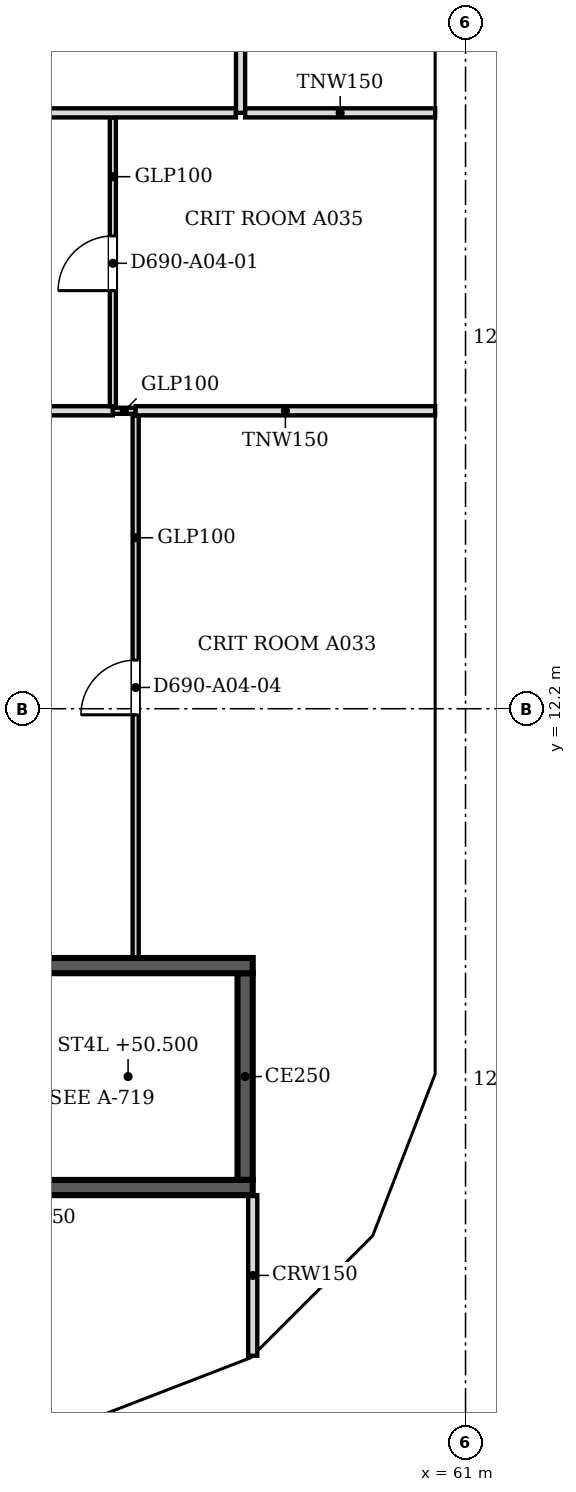
"""IFC4 building model, lengths in metres.
Left out: names, types, materials, properties, quantities, classifications, styles, units other than length and angle.
Written with IfcOpenShell. Run it as: python <this file> out.ifc"""

import sys

from ifc_helpers import new_model, si_unit, direction, frame, frame_2d, origin, place, context, subcontext, project, spatial, polyline, rectangle, outline, extrude, faceted_brep, source, transform, mapped, element, fill, save


model = new_model("IFC4")
c1 = context("Model", 3, precision=1e-05, world=origin(), true_north=direction((0.0, 1.0)))
c2 = subcontext(c1, "Body", "Model", "MODEL_VIEW")
j1 = project(units=[si_unit("LENGTHUNIT", "METRE"), si_unit("PLANEANGLEUNIT", "RADIAN")], contexts=[c1])
p1 = place(None, origin())
s1 = spatial("IfcSite", under=j1, at=p1, CompositionType="ELEMENT")
p2 = place(p1, origin())
s2 = spatial("IfcBuilding", under=s1, at=p2, CompositionType="ELEMENT")
p3 = place(p2, frame((0.0, 0.0, 48.6)))
s3 = spatial("IfcBuildingStorey", under=s2, at=p3, CompositionType="ELEMENT", Elevation=48.6)
m1 = source(origin(), c2, "Body", "Brep", [
    faceted_brep([(0.047, -0.25, 0.0), (2.997, -0.25, 3.8), (0.047, -0.25, 7.6), (0.0, -0.25, 7.541), (0.0, -0.25, 0.059), (0.093, 0.25, 7.54), (2.944, 0.25, 3.868), (2.944, 0.25, 3.732), (0.093, 0.25, 0.06), (2.997, 0.0, 3.8), (0.047, 0.0, 0.0), (0.047, 0.0, 7.6)], [[[0, 1, 2, 3, 4]], [[5, 6, 7, 8]], [[8, 7, 9, 1, 0, 10]], [[6, 5, 11, 2, 1, 9]], [[3, 2, 11]], [[10, 0, 4]], [[8, 10, 4, 3, 11, 5]], [[7, 6, 9]]]),
])
p4 = place(p3, frame((54.81, 0.233, -3.8), z_axis=(0.0, 0.0, 1.0), x_axis=(0.932990326376, 0.359901446078, 0.0)))
e1 = element("IfcWall", 1, at=p4, inside=s3, PredefinedType="SOLIDWALL", context=c2, shape_type="MappedRepresentation", body=[
    mapped(m1, transform((0.0, 0.0, 0.0), scale=1.0)),
])
m2 = source(origin(), c2, "Body", "SweptSolid", [
    extrude(outline(polyline([(0.247, 0.665), (2.681, 3.8), (0.247, 6.935), (0.247, 0.665)])), frame((0.0, 0.26, 0.0), z_axis=(0.0, -1.0, 0.0), x_axis=(1.0, 0.0, 0.0)), (0.0, 0.0, 1.0), 0.52),
])
p5 = place(p4, origin())
e2 = element("IfcOpeningElement", 2, at=p5, cuts=e1, PredefinedType="OPENING", context=c2, shape_type="MappedRepresentation", body=[
    mapped(m2, transform((0.0, 0.0, 0.0), scale=1.0)),
])
m3 = source(origin(), c2, "Body", "Brep", [
    faceted_brep([(2.944, -0.25, 0.0), (2.997, -0.25, 0.068), (2.997, -0.25, 7.532), (2.944, -0.25, 7.6), (0.0, -0.25, 3.8), (0.053, 0.25, 3.868), (2.891, 0.25, 7.532), (2.891, 0.25, 0.068), (0.053, 0.25, 3.732), (2.944, 0.0, 0.0), (2.944, 0.0, 7.6), (0.0, 0.0, 3.8)], [[[0, 1, 2, 3, 4]], [[5, 6, 7, 8]], [[1, 0, 9]], [[10, 3, 2]], [[6, 5, 11, 4, 3, 10]], [[8, 7, 9, 0, 4, 11]], [[8, 11, 5]], [[1, 9, 7, 6, 10, 2]]]),
])
p6 = place(p3, frame((57.606, 1.312, -3.8), z_axis=(0.0, 0.0, 1.0), x_axis=(0.707147509625, 0.707066050402, 0.0)))
e3 = element("IfcWall", 3, at=p6, inside=s3, PredefinedType="SOLIDWALL", context=c2, shape_type="MappedRepresentation", body=[
    mapped(m3, transform((0.0, 0.0, 0.0), scale=1.0)),
])
m4 = source(origin(), c2, "Body", "SweptSolid", [
    extrude(outline(polyline([(2.744, 6.934), (0.316, 3.8), (2.744, 0.666), (2.744, 6.934)])), frame((0.0, 0.26, 0.0), z_axis=(0.0, -1.0, 0.0), x_axis=(1.0, 0.0, 0.0)), (0.0, 0.0, 1.0), 0.52),
])
p7 = place(p6, origin())
e4 = element("IfcOpeningElement", 4, at=p7, cuts=e3, PredefinedType="OPENING", context=c2, shape_type="MappedRepresentation", body=[
    mapped(m4, transform((0.0, 0.0, 0.0), scale=1.0)),
])
m5 = source(origin(), c2, "Body", "Brep", [
    faceted_brep([(0.053, -0.25, 0.0), (3.003, -0.25, 3.8), (0.053, -0.25, 7.6), (0.0, -0.25, 7.531), (0.0, -0.25, 0.068), (0.106, 0.25, 7.532), (2.957, 0.25, 3.86), (2.957, 0.25, 3.74), (0.106, 0.25, 0.068), (3.003, 0.0, 3.8), (0.053, 0.0, 0.0), (0.053, 0.0, 7.6)], [[[0, 1, 2, 3, 4]], [[5, 6, 7, 8]], [[8, 7, 9, 1, 0, 10]], [[6, 5, 11, 2, 1, 9]], [[3, 2, 11]], [[10, 0, 4]], [[8, 10, 4, 3, 11, 5]], [[7, 6, 9]]]),
])
p8 = place(p3, frame((59.669, 3.344, -3.8), z_axis=(0.0, 0.0, 1.0), x_axis=(0.35992665181, 0.932980602862, 0.0)))
e5 = element("IfcWall", 5, at=p8, inside=s3, PredefinedType="SOLIDWALL", context=c2, shape_type="MappedRepresentation", body=[
    mapped(m5, transform((0.0, 0.0, 0.0), scale=1.0)),
])
m6 = source(origin(), c2, "Body", "SweptSolid", [
    extrude(outline(polyline([(0.253, 0.665), (2.687, 3.8), (0.253, 6.935), (0.253, 0.665)])), frame((0.0, 0.26, 0.0), z_axis=(0.0, -1.0, 0.0), x_axis=(1.0, 0.0, 0.0)), (0.0, 0.0, 1.0), 0.52),
])
p9 = place(p8, origin())
e6 = element("IfcOpeningElement", 6, at=p9, cuts=e5, PredefinedType="OPENING", context=c2, shape_type="MappedRepresentation", body=[
    mapped(m6, transform((0.0, 0.0, 0.0), scale=1.0)),
])
m7 = source(origin(), c2, "Body", "Brep", [
    faceted_brep([(3.003, -0.25, 0.0), (6.053, -0.25, 3.8), (3.003, -0.25, 7.6), (0.0, -0.25, 3.8), (0.047, 0.25, 3.859), (3.003, 0.25, 7.6), (6.053, 0.25, 3.8), (3.003, 0.25, 0.0), (0.047, 0.25, 3.741), (0.0, 0.0, 3.8)], [[[0, 1, 2, 3]], [[4, 5, 6, 7, 8]], [[7, 6, 1, 0]], [[6, 5, 2, 1]], [[5, 4, 9, 3, 2]], [[8, 7, 0, 3, 9]], [[8, 9, 4]]]),
])
p10 = place(p3, frame((60.75, 6.146, -3.8), z_axis=(0.0, 0.0, 1.0), x_axis=(0.0, 1.0, 0.0)))
e7 = element("IfcWall", 7, at=p10, inside=s3, PredefinedType="SOLIDWALL", context=c2, shape_type="MappedRepresentation", body=[
    mapped(m7, transform((0.0, 0.0, 0.0), scale=1.0)),
])
m8 = source(origin(), c2, "Body", "SweptSolid", [
    extrude(outline(polyline([(3.005, 0.401), (5.733, 3.8), (3.005, 7.199), (0.319, 3.8), (3.005, 0.401)])), frame((0.0, 0.26, 0.0), z_axis=(0.0, -1.0, 0.0), x_axis=(1.0, 0.0, 0.0)), (0.0, 0.0, 1.0), 0.52),
])
p11 = place(p10, origin())
e8 = element("IfcOpeningElement", 8, at=p11, cuts=e7, PredefinedType="OPENING", context=c2, shape_type="MappedRepresentation", body=[
    mapped(m8, transform((0.0, 0.0, 0.0), scale=1.0)),
])
m9 = source(origin(), c2, "Body", "SweptSolid", [
    extrude(outline(polyline([(3.05, 0.0), (6.1, 3.8), (3.05, 7.6), (0.0, 3.8), (3.05, 0.0)])), frame((0.0, 0.25, 0.0), z_axis=(0.0, -1.0, 0.0), x_axis=(1.0, 0.0, 0.0)), (0.0, 0.0, 1.0), 0.5),
])
p12 = place(p3, frame((60.75, 12.2, -3.8), z_axis=(0.0, 0.0, 1.0), x_axis=(0.0, 1.0, 0.0)))
e9 = element("IfcWall", 9, at=p12, inside=s3, PredefinedType="SOLIDWALL", context=c2, shape_type="MappedRepresentation", body=[
    mapped(m9, transform((0.0, 0.0, 0.0), scale=1.0)),
])
m10 = source(origin(), c2, "Body", "SweptSolid", [
    extrude(outline(polyline([(3.05, 0.399), (5.78, 3.8), (3.05, 7.2), (0.321, 3.8), (3.05, 0.399)])), frame((0.0, 0.26, 0.0), z_axis=(0.0, -1.0, 0.0), x_axis=(1.0, 0.0, 0.0)), (0.0, 0.0, 1.0), 0.52),
])
p13 = place(p12, origin())
e10 = element("IfcOpeningElement", 10, at=p13, cuts=e9, PredefinedType="OPENING", context=c2, shape_type="MappedRepresentation", body=[
    mapped(m10, transform((0.0, 0.0, 0.0), scale=1.0)),
])
m11 = source(origin(), c2, "Body", "Brep", [
    faceted_brep([(3.05, -0.25, 0.0), (6.1, -0.25, 3.8), (6.1, -0.25, 3.8), (3.05, -0.25, 7.6), (0.0, -0.25, 3.8), (0.0, 0.25, 3.8), (3.05, 0.25, 7.6), (6.1, 0.25, 3.8), (6.1, 0.25, 3.8), (3.05, 0.25, 0.0)], [[[0, 1, 2, 3, 4]], [[5, 6, 7, 8, 9]], [[9, 8, 1, 0]], [[7, 6, 3, 2]], [[6, 5, 4, 3]], [[5, 9, 0, 4]], [[1, 8, 7, 2]]]),
])
p14 = place(p3, frame((60.75, 18.3, -3.8), z_axis=(0.0, 0.0, 1.0), x_axis=(0.0, 1.0, 0.0)))
e11 = element("IfcWall", 11, at=p14, inside=s3, PredefinedType="SOLIDWALL", context=c2, shape_type="MappedRepresentation", body=[
    mapped(m11, transform((0.0, 0.0, 0.0), scale=1.0)),
])
p15 = place(p14, origin())
e12 = element("IfcOpeningElement", 12, at=p15, cuts=e11, PredefinedType="OPENING", context=c2, shape_type="MappedRepresentation", body=[
    mapped(m10, transform((0.0, 0.0, 0.0), scale=1.0)),
])
p16 = place(p2, frame((0.0, 0.0, 52.4)))
s4 = spatial("IfcBuildingStorey", under=s2, at=p16, CompositionType="ELEMENT", Elevation=52.4)
m12 = source(origin(), c2, "Body", "Brep", [
    faceted_brep([(2.95, -0.25, 0.0), (3.003, -0.25, 0.068), (3.003, -0.25, 7.531), (2.95, -0.25, 7.6), (0.0, -0.25, 3.8), (0.047, 0.25, 3.86), (2.898, 0.25, 7.532), (2.898, 0.25, 0.068), (0.047, 0.25, 3.74), (2.95, 0.0, 0.0), (2.95, 0.0, 7.6), (0.0, 0.0, 3.8)], [[[0, 1, 2, 3, 4]], [[5, 6, 7, 8]], [[1, 0, 9]], [[10, 3, 2]], [[6, 5, 11, 4, 3, 10]], [[8, 7, 9, 0, 4, 11]], [[8, 11, 5]], [[1, 9, 7, 6, 10, 2]]]),
])
p17 = place(p16, frame((54.854, 0.25, -3.8), z_axis=(0.0, 0.0, 1.0), x_axis=(0.932970071518, 0.359953949349, 0.0)))
e13 = element("IfcWall", 13, at=p17, inside=s4, PredefinedType="SOLIDWALL", context=c2, shape_type="MappedRepresentation", body=[
    mapped(m12, transform((0.0, 0.0, 0.0), scale=1.0)),
])
m13 = source(origin(), c2, "Body", "SweptSolid", [
    extrude(outline(polyline([(2.75, 6.935), (0.316, 3.8), (2.75, 0.665), (2.75, 6.935)])), frame((0.0, 0.26, 0.0), z_axis=(0.0, -1.0, 0.0), x_axis=(1.0, 0.0, 0.0)), (0.0, 0.0, 1.0), 0.52),
])
p18 = place(p17, origin())
e14 = element("IfcOpeningElement", 14, at=p18, cuts=e13, PredefinedType="OPENING", context=c2, shape_type="MappedRepresentation", body=[
    mapped(m13, transform((0.0, 0.0, 0.0), scale=1.0)),
])
m14 = source(origin(), c2, "Body", "Brep", [
    faceted_brep([(0.053, -0.25, 0.0), (2.997, -0.25, 3.8), (0.053, -0.25, 7.6), (0.0, -0.25, 7.532), (0.0, -0.25, 0.068), (0.106, 0.25, 7.531), (2.944, 0.25, 3.868), (2.944, 0.25, 3.732), (0.106, 0.25, 0.068), (2.997, 0.0, 3.8), (0.053, 0.0, 0.0), (0.053, 0.0, 7.6)], [[[0, 1, 2, 3, 4]], [[5, 6, 7, 8]], [[8, 7, 9, 1, 0, 10]], [[6, 5, 11, 2, 1, 9]], [[3, 2, 11]], [[10, 0, 4]], [[8, 10, 4, 3, 11, 5]], [[9, 7, 6]]]),
])
p19 = place(p16, frame((57.569, 1.274, -3.8), z_axis=(0.0, 0.0, 1.0), x_axis=(0.707066050402, 0.707147509625, 0.0)))
e15 = element("IfcWall", 15, at=p19, inside=s4, PredefinedType="SOLIDWALL", context=c2, shape_type="MappedRepresentation", body=[
    mapped(m14, transform((0.0, 0.0, 0.0), scale=1.0)),
])
m15 = source(origin(), c2, "Body", "SweptSolid", [
    extrude(outline(polyline([(0.253, 0.666), (2.681, 3.8), (0.253, 6.934), (0.253, 0.666)])), frame((0.0, 0.26, 0.0), z_axis=(0.0, -1.0, 0.0), x_axis=(1.0, 0.0, 0.0)), (0.0, 0.0, 1.0), 0.52),
])
p20 = place(p19, origin())
e16 = element("IfcOpeningElement", 16, at=p20, cuts=e15, PredefinedType="OPENING", context=c2, shape_type="MappedRepresentation", body=[
    mapped(m15, transform((0.0, 0.0, 0.0), scale=1.0)),
])
m16 = source(origin(), c2, "Body", "Brep", [
    faceted_brep([(2.95, -0.25, 0.0), (2.997, -0.25, 0.059), (2.997, -0.25, 7.541), (2.95, -0.25, 7.6), (0.0, -0.25, 3.8), (0.053, 0.25, 3.868), (2.904, 0.25, 7.54), (2.904, 0.25, 0.06), (0.053, 0.25, 3.732), (2.95, 0.0, 0.0), (2.95, 0.0, 7.6), (0.0, 0.0, 3.8)], [[[0, 1, 2, 3, 4]], [[5, 6, 7, 8]], [[1, 0, 9]], [[10, 3, 2]], [[6, 5, 11, 4, 3, 10]], [[8, 7, 9, 0, 4, 11]], [[8, 11, 5]], [[1, 9, 7, 6, 10, 2]]]),
])
p21 = place(p16, frame((59.688, 3.394, -3.8), z_axis=(0.0, 0.0, 1.0), x_axis=(0.359972353723, 0.932962970624, 0.0)))
e17 = element("IfcWall", 17, at=p21, inside=s4, PredefinedType="SOLIDWALL", context=c2, shape_type="MappedRepresentation", body=[
    mapped(m16, transform((0.0, 0.0, 0.0), scale=1.0)),
])
p22 = place(p21, origin())
e18 = element("IfcOpeningElement", 18, at=p22, cuts=e17, PredefinedType="OPENING", context=c2, shape_type="MappedRepresentation", body=[
    mapped(m13, transform((0.0, 0.0, 0.0), scale=1.0)),
])
m17 = source(origin(), c2, "Body", "Brep", [
    faceted_brep([(0.047, -0.25, 0.0), (3.05, -0.25, 3.8), (0.047, -0.25, 7.6), (0.0, -0.25, 7.54), (0.0, -0.25, 0.06), (0.093, 0.25, 7.541), (3.05, 0.25, 3.8), (0.093, 0.25, 0.059), (0.047, 0.0, 0.0), (0.047, 0.0, 7.6)], [[[0, 1, 2, 3, 4]], [[5, 6, 7]], [[7, 6, 1, 0, 8]], [[6, 5, 9, 2, 1]], [[3, 2, 9]], [[8, 0, 4]], [[7, 8, 4, 3, 9, 5]]]),
])
p23 = place(p16, frame((60.75, 6.1, -3.8), z_axis=(0.0, 0.0, 1.0), x_axis=(0.0, 1.0, 0.0)))
e19 = element("IfcWall", 19, at=p23, inside=s4, PredefinedType="SOLIDWALL", context=c2, shape_type="MappedRepresentation", body=[
    mapped(m17, transform((0.0, 0.0, 0.0), scale=1.0)),
])
m18 = source(origin(), c2, "Body", "SweptSolid", [
    extrude(outline(polyline([(0.247, 0.656), (2.731, 3.8), (0.247, 6.944), (0.247, 0.656)])), frame((0.0, 0.26, 0.0), z_axis=(0.0, -1.0, 0.0), x_axis=(1.0, 0.0, 0.0)), (0.0, 0.0, 1.0), 0.52),
])
p24 = place(p23, origin())
e20 = element("IfcOpeningElement", 20, at=p24, cuts=e19, PredefinedType="OPENING", context=c2, shape_type="MappedRepresentation", body=[
    mapped(m18, transform((0.0, 0.0, 0.0), scale=1.0)),
])
m19 = source(origin(), c2, "Body", "SweptSolid", [
    extrude(outline(polyline([(3.05, 0.0), (6.1, 3.8), (3.05, 7.6), (0.0, 3.8), (3.05, 0.0)])), frame((0.0, 0.25, 0.0), z_axis=(0.0, -1.0, 0.0), x_axis=(1.0, 0.0, 0.0)), (0.0, 0.0, 1.0), 0.5),
])
p25 = place(p16, frame((60.75, 9.15, -3.8), z_axis=(0.0, 0.0, 1.0), x_axis=(0.0, 1.0, 0.0)))
e21 = element("IfcWall", 21, at=p25, inside=s4, PredefinedType="SOLIDWALL", context=c2, shape_type="MappedRepresentation", body=[
    mapped(m19, transform((0.0, 0.0, 0.0), scale=1.0)),
])
m20 = source(origin(), c2, "Body", "SweptSolid", [
    extrude(outline(polyline([(3.05, 0.399), (5.78, 3.8), (3.05, 7.2), (0.321, 3.8), (3.05, 0.399)])), frame((0.0, 0.26, 0.0), z_axis=(0.0, -1.0, 0.0), x_axis=(1.0, 0.0, 0.0)), (0.0, 0.0, 1.0), 0.52),
])
p26 = place(p25, origin())
e22 = element("IfcOpeningElement", 22, at=p26, cuts=e21, PredefinedType="OPENING", context=c2, shape_type="MappedRepresentation", body=[
    mapped(m20, transform((0.0, 0.0, 0.0), scale=1.0)),
])
p27 = place(p16, frame((60.75, 15.25, -3.8), z_axis=(0.0, 0.0, 1.0), x_axis=(0.0, 1.0, 0.0)))
e23 = element("IfcWall", 23, at=p27, inside=s4, PredefinedType="SOLIDWALL", context=c2, shape_type="MappedRepresentation", body=[
    mapped(m19, transform((0.0, 0.0, 0.0), scale=1.0)),
])
p28 = place(p27, origin())
e24 = element("IfcOpeningElement", 24, at=p28, cuts=e23, PredefinedType="OPENING", context=c2, shape_type="MappedRepresentation", body=[
    mapped(m20, transform((0.0, 0.0, 0.0), scale=1.0)),
])
m21 = source(origin(), c2, "Body", "Brep", [
    faceted_brep([(3.05, -0.25, 0.0), (6.1, -0.25, 3.8), (6.1, -0.25, 3.8), (3.05, -0.25, 7.6), (0.0, -0.25, 3.8), (0.0, 0.25, 3.8), (3.05, 0.25, 7.6), (6.1, 0.25, 3.8), (6.1, 0.25, 3.8), (3.05, 0.25, 0.0)], [[[0, 1, 2, 3, 4]], [[5, 6, 7, 8, 9]], [[9, 8, 1, 0]], [[7, 6, 3, 2]], [[6, 5, 4, 3]], [[5, 9, 0, 4]], [[1, 8, 7, 2]]]),
])
p29 = place(p16, frame((60.75, 21.35, -3.8), z_axis=(0.0, 0.0, 1.0), x_axis=(0.0, 1.0, 0.0)))
e25 = element("IfcWall", 25, at=p29, inside=s4, PredefinedType="SOLIDWALL", context=c2, shape_type="MappedRepresentation", body=[
    mapped(m21, transform((0.0, 0.0, 0.0), scale=1.0)),
])
p30 = place(p29, origin())
e26 = element("IfcOpeningElement", 26, at=p30, cuts=e25, PredefinedType="OPENING", context=c2, shape_type="MappedRepresentation", body=[
    mapped(m20, transform((0.0, 0.0, 0.0), scale=1.0)),
])
p31 = place(p3, frame((57.5, 4.325, 0.0), z_axis=(0.0, 0.0, 1.0), x_axis=(-1.0, 0.0, 0.0)))
e27 = element("IfcWall", 27, at=p31, inside=s3, PredefinedType="SOLIDWALL", context=c2, shape_type="SweptSolid", body=[
    extrude(rectangle(XDim=8.5, YDim=0.25, at=frame_2d((4.25, 0.0))), origin(), (0.0, 0.0, 1.0), 3.8),
])
m22 = source(origin(), c2, "Body", "SweptSolid", [
    extrude(rectangle(XDim=1.2, YDim=2.1, at=frame_2d((0.6, 1.05))), frame((0.0, 0.135, 0.0), z_axis=(0.0, -1.0, 0.0), x_axis=(1.0, 0.0, 0.0)), (0.0, 0.0, 1.0), 0.27),
])
p32 = place(p31, frame((6.9, 0.0, 0.0)))
e28 = element("IfcOpeningElement", 28, at=p32, cuts=e27, PredefinedType="OPENING", context=c2, shape_type="MappedRepresentation", body=[
    mapped(m22, transform((0.0, 0.0, 0.0), scale=1.0)),
])
p33 = place(p3, frame((49.0, 7.975, 0.0), z_axis=(0.0, 0.0, 1.0), x_axis=(1.0, 0.0, 0.0)))
e29 = element("IfcWall", 29, at=p33, inside=s3, PredefinedType="SOLIDWALL", context=c2, shape_type="SweptSolid", body=[
    extrude(rectangle(XDim=8.5, YDim=0.25, at=frame_2d((4.25, 0.0))), origin(), (0.0, 0.0, 1.0), 3.8),
])
p34 = place(p3, frame((57.375, 7.85, 0.0), z_axis=(0.0, 0.0, 1.0), x_axis=(0.0, -1.0, 0.0)))
e30 = element("IfcWall", 30, at=p34, inside=s3, PredefinedType="SOLIDWALL", context=c2, shape_type="SweptSolid", body=[
    extrude(rectangle(XDim=3.4, YDim=0.25, at=frame_2d((1.7, 0.0))), origin(), (0.0, 0.0, 1.0), 3.8),
])
p35 = place(p3, frame((57.5, 1.559, 0.0), z_axis=(0.0, 0.0, 1.0), x_axis=(0.0, 1.0, 0.0)))
e31 = element("IfcWall", 31, at=p35, inside=s3, PredefinedType="PARTITIONING", context=c2, shape_type="SweptSolid", body=[
    extrude(rectangle(XDim=2.641, YDim=0.15, at=frame_2d((1.32, 0.0))), origin(), (0.0, 0.0, 1.0), 3.067),
])
p36 = place(p3, frame((55.575, 17.024, 0.0), z_axis=(0.0, 0.0, 1.0), x_axis=(0.0, -1.0, 0.0)))
e32 = element("IfcWall", 32, at=p36, inside=s3, PredefinedType="PARTITIONING", context=c2, shape_type="SweptSolid", body=[
    extrude(rectangle(XDim=8.924, YDim=0.1, at=frame_2d((4.462, 0.0))), origin(), (0.0, 0.0, 1.0), 3.067),
])
m23 = source(origin(), c2, "Body", "SweptSolid", [
    extrude(rectangle(XDim=0.9, YDim=2.1, at=frame_2d((0.45, 1.05))), frame((0.0, 0.06, 0.0), z_axis=(0.0, -1.0, 0.0), x_axis=(1.0, 0.0, 0.0)), (0.0, 0.0, 1.0), 0.12),
])
p37 = place(p36, frame((4.024, 0.0, 0.0)))
e33 = element("IfcOpeningElement", 33, at=p37, cuts=e32, PredefinedType="OPENING", context=c2, shape_type="MappedRepresentation", body=[
    mapped(m23, transform((0.0, 0.0, 0.0), scale=1.0)),
])
p38 = place(p3, frame((46.476, 17.1, 0.0), z_axis=(0.0, 0.0, 1.0), x_axis=(1.0, 0.0, 0.0)))
e34 = element("IfcWall", 34, at=p38, inside=s3, PredefinedType="PARTITIONING", context=c2, shape_type="SweptSolid", body=[
    extrude(rectangle(XDim=8.724, YDim=0.15, at=frame_2d((4.362, 0.0))), origin(), (0.0, 0.0, 1.0), 3.067),
])
p39 = place(p3, frame((55.201, 17.1, 0.0), z_axis=(0.0, 0.0, 1.0), x_axis=(1.0, 0.0, 0.0)))
e35 = element("IfcWall", 35, at=p39, inside=s3, PredefinedType="PARTITIONING", context=c2, shape_type="SweptSolid", body=[
    extrude(rectangle(XDim=0.373, YDim=0.1, at=frame_2d((0.187, 0.0))), origin(), (0.0, 0.0, 1.0), 3.067),
])
p40 = place(p3, frame((55.575, 17.1, 0.0), z_axis=(0.0, 0.0, 1.0), x_axis=(1.0, 0.0, 0.0)))
e36 = element("IfcWall", 36, at=p40, inside=s3, PredefinedType="PARTITIONING", context=c2, shape_type="SweptSolid", body=[
    extrude(rectangle(XDim=4.925, YDim=0.15, at=frame_2d((2.462, 0.0))), origin(), (0.0, 0.0, 1.0), 3.067),
])
p41 = place(p3, frame((55.2, 21.924, 0.0), z_axis=(0.0, 0.0, 1.0), x_axis=(0.0, -1.0, 0.0)))
e37 = element("IfcWall", 37, at=p41, inside=s3, PredefinedType="PARTITIONING", context=c2, shape_type="SweptSolid", body=[
    extrude(rectangle(XDim=4.748, YDim=0.1, at=frame_2d((2.374, 0.0))), origin(), (0.0, 0.0, 1.0), 3.067),
])
p42 = place(p41, frame((1.948, 0.0, 0.0)))
e38 = element("IfcOpeningElement", 38, at=p42, cuts=e37, PredefinedType="OPENING", context=c2, shape_type="MappedRepresentation", body=[
    mapped(m23, transform((0.0, 0.0, 0.0), scale=1.0)),
])
p43 = place(p3, frame((46.4, 22.0, 0.0), z_axis=(0.0, 0.0, 1.0), x_axis=(1.0, 0.0, 0.0)))
e39 = element("IfcWall", 39, at=p43, inside=s3, PredefinedType="PARTITIONING", context=c2, shape_type="SweptSolid", body=[
    extrude(rectangle(XDim=10.824, YDim=0.15, at=frame_2d((5.412, 0.0))), origin(), (0.0, 0.0, 1.0), 3.067),
])
p44 = place(p3, frame((57.3, 30.6, 0.0), z_axis=(0.0, 0.0, 1.0), x_axis=(0.0, -1.0, 0.0)))
e40 = element("IfcWall", 40, at=p44, inside=s3, PredefinedType="PARTITIONING", context=c2, shape_type="SweptSolid", body=[
    extrude(rectangle(XDim=8.6, YDim=0.15, at=frame_2d((4.3, 0.0))), origin(), (0.0, 0.0, 1.0), 3.067),
])
m24 = source(origin(), c2, "Body", "SweptSolid", [
    extrude(rectangle(XDim=0.9, YDim=2.1, at=frame_2d((0.45, 1.05))), frame((0.0, 0.085, 0.0), z_axis=(0.0, -1.0, 0.0), x_axis=(1.0, 0.0, 0.0)), (0.0, 0.0, 1.0), 0.17),
])
p45 = place(p44, frame((3.9, 0.0, 0.0)))
e41 = element("IfcOpeningElement", 41, at=p45, cuts=e40, PredefinedType="OPENING", context=c2, shape_type="MappedRepresentation", body=[
    mapped(m24, transform((0.0, 0.0, 0.0), scale=1.0)),
])
p46 = place(p3, frame((57.376, 22.0, 0.0), z_axis=(0.0, 0.0, 1.0), x_axis=(1.0, 0.0, 0.0)))
e42 = element("IfcWall", 42, at=p46, inside=s3, PredefinedType="PARTITIONING", context=c2, shape_type="SweptSolid", body=[
    extrude(rectangle(XDim=3.124, YDim=0.15, at=frame_2d((1.562, 0.0))), origin(), (0.0, 0.0, 1.0), 3.067),
])
m25 = source(origin(), c2, "Body", "SweptSolid", [
    extrude(rectangle(XDim=0.9, YDim=2.1, at=frame_2d((0.45, 1.05))), frame((0.0, 0.025, 0.0), z_axis=(0.0, -1.0, 0.0), x_axis=(1.0, 0.0, 0.0)), (0.0, 0.0, 1.0), 0.05),
])
p47 = place(p42, origin())
e43 = element("IfcDoor", 43, at=p47, inside=s3, OperationType="SINGLE_SWING_RIGHT", PredefinedType="DOOR", context=c2, shape_type="MappedRepresentation", body=[
    mapped(m25, transform((0.0, 0.0, 0.0), scale=1.0)),
])
fill(e38, e43)
p48 = place(p37, origin())
e44 = element("IfcDoor", 44, at=p48, inside=s3, OperationType="SINGLE_SWING_RIGHT", PredefinedType="DOOR", context=c2, shape_type="MappedRepresentation", body=[
    mapped(m25, transform((0.0, 0.0, 0.0), scale=1.0)),
])
fill(e33, e44)
save(model, sys.argv[1])
